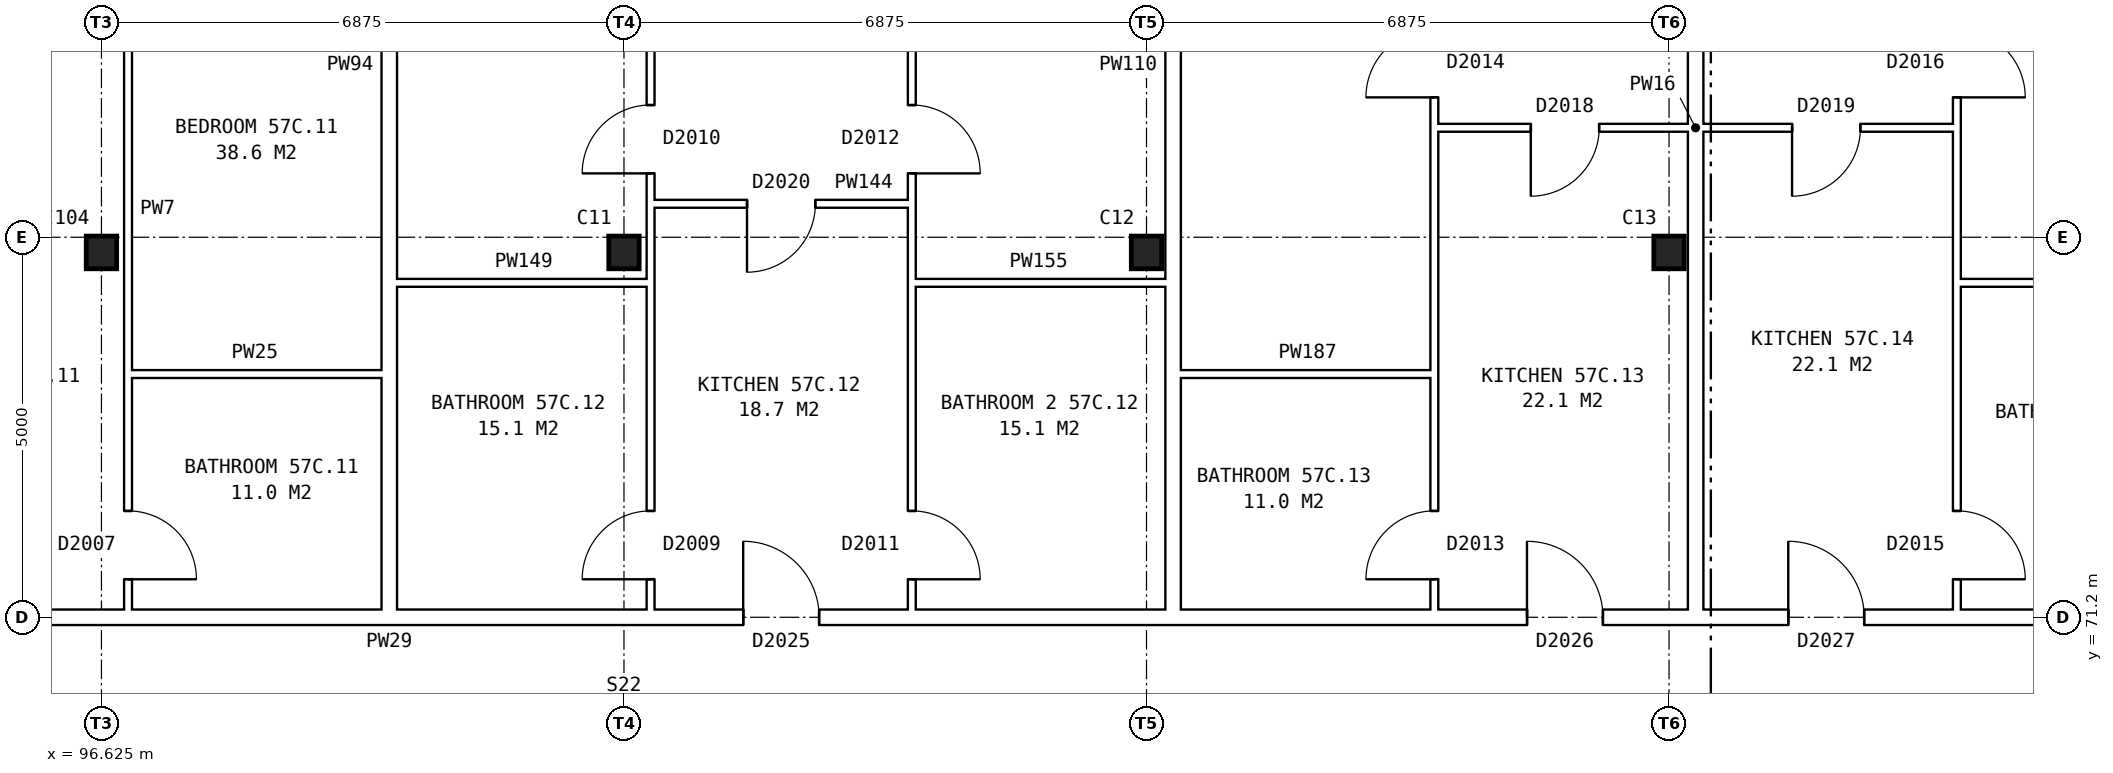
"""IFC4 building model, lengths in metres.
Left out: names, types, materials, properties, quantities, classifications, styles, units other than length and angle.
Written with IfcOpenShell. Run it as: python <this file> out.ifc"""

import sys

from ifc_helpers import new_model, si_unit, direction, frame, frame_2d, origin, origin_2d, place, context, subcontext, project, spatial, rectangle, i_section, extrude, element, fill, save


model = new_model("IFC4")
c1 = context("Model", 3, precision=1e-05, world=origin(), true_north=direction((0.0, 1.0)))
c2 = subcontext(c1, "Body", "Model", "MODEL_VIEW")
j1 = project(units=[si_unit("LENGTHUNIT", "METRE"), si_unit("PLANEANGLEUNIT", "RADIAN")], contexts=[c1])
p1 = place(None, origin())
s1 = spatial("IfcSite", under=j1, at=p1, CompositionType="ELEMENT")
p2 = place(p1, origin())
s2 = spatial("IfcBuilding", under=s1, at=p2, CompositionType="ELEMENT")
p3 = place(p2, frame((0.0, 0.0, 202.8)))
s3 = spatial("IfcBuildingStorey", under=s2, at=p3, CompositionType="ELEMENT", Elevation=202.8)
for number, where, z_axis, x_axis in (
    (1, (96.625, 76.0, 0.0), (0.0, 0.0, 1.0), (1.0, 0.0, 0.0)),
    (2, (103.5, 76.0, 0.0), (0.0, 0.0, 1.0), (1.0, 0.0, 0.0)),
    (3, (110.375, 76.0, 0.0), (0.0, 0.0, 1.0), (1.0, 0.0, 0.0)),
    (4, (117.25, 76.0, 0.0), (0.0, 0.0, 1.0), (1.0, 0.0, 0.0)),
):
    element("IfcColumn", number, at=place(p3, frame(where, z_axis=z_axis, x_axis=x_axis)), inside=s3, PredefinedType="COLUMN", context=c2, shape_type="SweptSolid", body=[
        extrude(i_section(OverallWidth=0.4, OverallDepth=0.43, WebThickness=0.04, FlangeThickness=0.04, at=origin_2d()), origin(), (0.0, 0.0, 1.0), 2.85),
    ])
p4 = place(p3, frame((83.225, 71.2, 0.0), z_axis=(0.0, 0.0, 1.0), x_axis=(1.0, 0.0, 0.0)))
e5 = element("IfcWall", 5, at=p4, inside=s3, PredefinedType="PARTITIONING", context=c2, shape_type="SweptSolid", body=[
    extrude(rectangle(XDim=41.25, YDim=0.2, at=frame_2d((20.625, 0.0))), origin(), (0.0, 0.0, 1.0), 2.85),
])
p5 = place(p4, frame((4.656, 0.0, 0.0)))
e6 = element("IfcOpeningElement", 6, at=p5, cuts=e5, PredefinedType="OPENING", context=c2, shape_type="SweptSolid", body=[
    extrude(rectangle(XDim=1.0, YDim=2.1, at=frame_2d((0.5, 1.05))), frame((0.0, 0.11, 0.0), z_axis=(0.0, -1.0, 0.0), x_axis=(1.0, 0.0, 0.0)), (0.0, 0.0, 1.0), 0.22),
])
p6 = place(p4, frame((11.531, 0.0, 0.0)))
e7 = element("IfcOpeningElement", 7, at=p6, cuts=e5, PredefinedType="OPENING", context=c2, shape_type="SweptSolid", body=[
    extrude(rectangle(XDim=1.0, YDim=2.1, at=frame_2d((0.5, 1.05))), frame((0.0, 0.11, 0.0), z_axis=(0.0, -1.0, 0.0), x_axis=(1.0, 0.0, 0.0)), (0.0, 0.0, 1.0), 0.22),
])
p7 = place(p4, frame((21.844, 0.0, 0.0)))
e8 = element("IfcOpeningElement", 8, at=p7, cuts=e5, PredefinedType="OPENING", context=c2, shape_type="SweptSolid", body=[
    extrude(rectangle(XDim=1.0, YDim=2.1, at=frame_2d((0.5, 1.05))), frame((0.0, 0.11, 0.0), z_axis=(0.0, -1.0, 0.0), x_axis=(1.0, 0.0, 0.0)), (0.0, 0.0, 1.0), 0.22),
])
p8 = place(p4, frame((32.156, 0.0, 0.0)))
e9 = element("IfcOpeningElement", 9, at=p8, cuts=e5, PredefinedType="OPENING", context=c2, shape_type="SweptSolid", body=[
    extrude(rectangle(XDim=1.0, YDim=2.1, at=frame_2d((0.5, 1.05))), frame((0.0, 0.11, 0.0), z_axis=(0.0, -1.0, 0.0), x_axis=(1.0, 0.0, 0.0)), (0.0, 0.0, 1.0), 0.22),
])
p9 = place(p4, frame((35.594, 0.0, 0.0)))
e10 = element("IfcOpeningElement", 10, at=p9, cuts=e5, PredefinedType="OPENING", context=c2, shape_type="SweptSolid", body=[
    extrude(rectangle(XDim=1.0, YDim=2.1, at=frame_2d((0.5, 1.05))), frame((0.0, 0.11, 0.0), z_axis=(0.0, -1.0, 0.0), x_axis=(1.0, 0.0, 0.0)), (0.0, 0.0, 1.0), 0.22),
])
p10 = place(p3, frame((96.975, 74.4, 0.0), z_axis=(0.0, 0.0, 1.0), x_axis=(1.0, 0.0, 0.0)))
e11 = element("IfcWall", 11, at=p10, inside=s3, PredefinedType="PARTITIONING", context=c2, shape_type="SweptSolid", body=[
    extrude(rectangle(XDim=3.337, YDim=0.1, at=frame_2d((1.668, 0.0))), origin(), (0.0, 0.0, 1.0), 2.85),
])
p11 = place(p3, frame((110.825, 74.4, 0.0), z_axis=(0.0, 0.0, 1.0), x_axis=(1.0, 0.0, 0.0)))
e12 = element("IfcWall", 12, at=p11, inside=s3, PredefinedType="PARTITIONING", context=c2, shape_type="SweptSolid", body=[
    extrude(rectangle(XDim=3.337, YDim=0.1, at=frame_2d((1.668, 0.0))), origin(), (0.0, 0.0, 1.0), 2.85),
])
p12 = place(p3, frame((100.512, 75.6, 0.0), z_axis=(0.0, 0.0, 1.0), x_axis=(1.0, 0.0, 0.0)))
e13 = element("IfcWall", 13, at=p12, inside=s3, PredefinedType="PARTITIONING", context=c2, shape_type="SweptSolid", body=[
    extrude(rectangle(XDim=3.338, YDim=0.1, at=frame_2d((1.669, 0.0))), origin(), (0.0, 0.0, 1.0), 2.85),
])
for number, where, z_axis, x_axis in (
    (14, (107.287, 75.6, 0.0), (0.0, 0.0, 1.0), (1.0, 0.0, 0.0)),
    (15, (121.037, 75.6, 0.0), (0.0, 0.0, 1.0), (1.0, 0.0, 0.0)),
):
    element("IfcWall", number, at=place(p3, frame(where, z_axis=z_axis, x_axis=x_axis)), inside=s3, PredefinedType="PARTITIONING", context=c2, shape_type="SweptSolid", body=[
        extrude(rectangle(XDim=3.338, YDim=0.1, at=frame_2d((1.669, 0.0))), origin(), (0.0, 0.0, 1.0), 2.85),
    ])
p13 = place(p3, frame((103.85, 76.64, 0.0), z_axis=(0.0, 0.0, 1.0), x_axis=(1.0, 0.0, 0.0)))
e16 = element("IfcWall", 16, at=p13, inside=s3, PredefinedType="PARTITIONING", context=c2, shape_type="SweptSolid", body=[
    extrude(rectangle(XDim=3.437, YDim=0.1, at=frame_2d((1.719, 0.0))), origin(), (0.0, 0.0, 1.0), 2.85),
])
p14 = place(p13, frame((1.269, 0.0, 0.0)))
e17 = element("IfcOpeningElement", 17, at=p14, cuts=e16, PredefinedType="OPENING", context=c2, shape_type="SweptSolid", body=[
    extrude(rectangle(XDim=0.9, YDim=2.1, at=frame_2d((0.45, 1.05))), frame((0.0, 0.06, 0.0), z_axis=(0.0, -1.0, 0.0), x_axis=(1.0, 0.0, 0.0)), (0.0, 0.0, 1.0), 0.12),
])
p15 = place(p3, frame((114.162, 77.64, 0.0), z_axis=(0.0, 0.0, 1.0), x_axis=(1.0, 0.0, 0.0)))
e18 = element("IfcWall", 18, at=p15, inside=s3, PredefinedType="PARTITIONING", context=c2, shape_type="SweptSolid", body=[
    extrude(rectangle(XDim=6.875, YDim=0.1, at=frame_2d((3.438, 0.0))), origin(), (0.0, 0.0, 1.0), 2.85),
])
p16 = place(p15, frame((1.269, 0.0, 0.0)))
e19 = element("IfcOpeningElement", 19, at=p16, cuts=e18, PredefinedType="OPENING", context=c2, shape_type="SweptSolid", body=[
    extrude(rectangle(XDim=0.9, YDim=2.1, at=frame_2d((0.45, 1.05))), frame((0.0, 0.06, 0.0), z_axis=(0.0, -1.0, 0.0), x_axis=(1.0, 0.0, 0.0)), (0.0, 0.0, 1.0), 0.12),
])
p17 = place(p15, frame((4.707, 0.0, 0.0)))
e20 = element("IfcOpeningElement", 20, at=p17, cuts=e18, PredefinedType="OPENING", context=c2, shape_type="SweptSolid", body=[
    extrude(rectangle(XDim=0.9, YDim=2.1, at=frame_2d((0.45, 1.05))), frame((0.0, 0.06, 0.0), z_axis=(0.0, -1.0, 0.0), x_axis=(1.0, 0.0, 0.0)), (0.0, 0.0, 1.0), 0.12),
])
p18 = place(p3, frame((96.975, 71.3, 0.0), z_axis=(0.0, 0.0, 1.0), x_axis=(0.0, 1.0, 0.0)))
e21 = element("IfcWall", 21, at=p18, inside=s3, PredefinedType="PARTITIONING", context=c2, shape_type="SweptSolid", body=[
    extrude(rectangle(XDim=14.34, YDim=0.1, at=frame_2d((7.17, 0.0))), origin(), (0.0, 0.0, 1.0), 2.85),
])
p19 = place(p18, frame((9.24, 0.0, 0.0)))
e22 = element("IfcOpeningElement", 22, at=p19, cuts=e21, PredefinedType="OPENING", context=c2, shape_type="SweptSolid", body=[
    extrude(rectangle(XDim=0.9, YDim=2.1, at=frame_2d((0.45, 1.05))), frame((0.0, 0.06, 0.0), z_axis=(0.0, -1.0, 0.0), x_axis=(1.0, 0.0, 0.0)), (0.0, 0.0, 1.0), 0.12),
])
p20 = place(p18, frame((0.4, 0.0, 0.0)))
e23 = element("IfcOpeningElement", 23, at=p20, cuts=e21, PredefinedType="OPENING", context=c2, shape_type="SweptSolid", body=[
    extrude(rectangle(XDim=0.9, YDim=2.1, at=frame_2d((0.45, 1.05))), frame((0.0, 0.06, 0.0), z_axis=(0.0, -1.0, 0.0), x_axis=(1.0, 0.0, 0.0)), (0.0, 0.0, 1.0), 0.12),
])
p21 = place(p3, frame((100.412, 71.3, 0.0), z_axis=(0.0, 0.0, 1.0), x_axis=(0.0, 1.0, 0.0)))
e24 = element("IfcWall", 24, at=p21, inside=s3, PredefinedType="PARTITIONING", context=c2, shape_type="SweptSolid", body=[
    extrude(rectangle(XDim=14.34, YDim=0.2, at=frame_2d((7.17, 0.0))), origin(), (0.0, 0.0, 1.0), 2.85),
])
p22 = place(p3, frame((103.85, 71.3, 0.0), z_axis=(0.0, 0.0, 1.0), x_axis=(0.0, 1.0, 0.0)))
e25 = element("IfcWall", 25, at=p22, inside=s3, PredefinedType="PARTITIONING", context=c2, shape_type="SweptSolid", body=[
    extrude(rectangle(XDim=14.34, YDim=0.1, at=frame_2d((7.17, 0.0))), origin(), (0.0, 0.0, 1.0), 2.85),
])
p23 = place(p22, frame((5.74, 0.0, 0.0)))
e26 = element("IfcOpeningElement", 26, at=p23, cuts=e25, PredefinedType="OPENING", context=c2, shape_type="SweptSolid", body=[
    extrude(rectangle(XDim=0.9, YDim=2.1, at=frame_2d((0.45, 1.05))), frame((0.0, 0.06, 0.0), z_axis=(0.0, -1.0, 0.0), x_axis=(1.0, 0.0, 0.0)), (0.0, 0.0, 1.0), 0.12),
])
p24 = place(p22, frame((0.4, 0.0, 0.0)))
e27 = element("IfcOpeningElement", 27, at=p24, cuts=e25, PredefinedType="OPENING", context=c2, shape_type="SweptSolid", body=[
    extrude(rectangle(XDim=0.9, YDim=2.1, at=frame_2d((0.45, 1.05))), frame((0.0, 0.06, 0.0), z_axis=(0.0, -1.0, 0.0), x_axis=(1.0, 0.0, 0.0)), (0.0, 0.0, 1.0), 0.12),
])
p25 = place(p3, frame((107.287, 71.3, 0.0), z_axis=(0.0, 0.0, 1.0), x_axis=(0.0, 1.0, 0.0)))
e28 = element("IfcWall", 28, at=p25, inside=s3, PredefinedType="PARTITIONING", context=c2, shape_type="SweptSolid", body=[
    extrude(rectangle(XDim=14.34, YDim=0.1, at=frame_2d((7.17, 0.0))), origin(), (0.0, 0.0, 1.0), 2.85),
])
p26 = place(p25, frame((5.74, 0.0, 0.0)))
e29 = element("IfcOpeningElement", 29, at=p26, cuts=e28, PredefinedType="OPENING", context=c2, shape_type="SweptSolid", body=[
    extrude(rectangle(XDim=0.9, YDim=2.1, at=frame_2d((0.45, 1.05))), frame((0.0, 0.06, 0.0), z_axis=(0.0, -1.0, 0.0), x_axis=(1.0, 0.0, 0.0)), (0.0, 0.0, 1.0), 0.12),
])
p27 = place(p25, frame((0.4, 0.0, 0.0)))
e30 = element("IfcOpeningElement", 30, at=p27, cuts=e28, PredefinedType="OPENING", context=c2, shape_type="SweptSolid", body=[
    extrude(rectangle(XDim=0.9, YDim=2.1, at=frame_2d((0.45, 1.05))), frame((0.0, 0.06, 0.0), z_axis=(0.0, -1.0, 0.0), x_axis=(1.0, 0.0, 0.0)), (0.0, 0.0, 1.0), 0.12),
])
p28 = place(p3, frame((110.725, 71.3, 0.0), z_axis=(0.0, 0.0, 1.0), x_axis=(0.0, 1.0, 0.0)))
e31 = element("IfcWall", 31, at=p28, inside=s3, PredefinedType="PARTITIONING", context=c2, shape_type="SweptSolid", body=[
    extrude(rectangle(XDim=14.34, YDim=0.2, at=frame_2d((7.17, 0.0))), origin(), (0.0, 0.0, 1.0), 2.85),
])
p29 = place(p3, frame((114.162, 71.3, 0.0), z_axis=(0.0, 0.0, 1.0), x_axis=(0.0, 1.0, 0.0)))
e32 = element("IfcWall", 32, at=p29, inside=s3, PredefinedType="PARTITIONING", context=c2, shape_type="SweptSolid", body=[
    extrude(rectangle(XDim=14.34, YDim=0.1, at=frame_2d((7.17, 0.0))), origin(), (0.0, 0.0, 1.0), 2.85),
])
p30 = place(p29, frame((6.74, 0.0, 0.0)))
e33 = element("IfcOpeningElement", 33, at=p30, cuts=e32, PredefinedType="OPENING", context=c2, shape_type="SweptSolid", body=[
    extrude(rectangle(XDim=0.9, YDim=2.1, at=frame_2d((0.45, 1.05))), frame((0.0, 0.06, 0.0), z_axis=(0.0, -1.0, 0.0), x_axis=(1.0, 0.0, 0.0)), (0.0, 0.0, 1.0), 0.12),
])
p31 = place(p29, frame((0.4, 0.0, 0.0)))
e34 = element("IfcOpeningElement", 34, at=p31, cuts=e32, PredefinedType="OPENING", context=c2, shape_type="SweptSolid", body=[
    extrude(rectangle(XDim=0.9, YDim=2.1, at=frame_2d((0.45, 1.05))), frame((0.0, 0.06, 0.0), z_axis=(0.0, -1.0, 0.0), x_axis=(1.0, 0.0, 0.0)), (0.0, 0.0, 1.0), 0.12),
])
p32 = place(p3, frame((117.6, 71.3, 0.0), z_axis=(0.0, 0.0, 1.0), x_axis=(0.0, 1.0, 0.0)))
e35 = element("IfcWall", 35, at=p32, inside=s3, PredefinedType="PARTITIONING", context=c2, shape_type="SweptSolid", body=[
    extrude(rectangle(XDim=14.34, YDim=0.2, at=frame_2d((7.17, 0.0))), origin(), (0.0, 0.0, 1.0), 2.85),
])
p33 = place(p3, frame((121.037, 71.3, 0.0), z_axis=(0.0, 0.0, 1.0), x_axis=(0.0, 1.0, 0.0)))
e36 = element("IfcWall", 36, at=p33, inside=s3, PredefinedType="PARTITIONING", context=c2, shape_type="SweptSolid", body=[
    extrude(rectangle(XDim=14.34, YDim=0.1, at=frame_2d((7.17, 0.0))), origin(), (0.0, 0.0, 1.0), 2.85),
])
p34 = place(p33, frame((6.74, 0.0, 0.0)))
e37 = element("IfcOpeningElement", 37, at=p34, cuts=e36, PredefinedType="OPENING", context=c2, shape_type="SweptSolid", body=[
    extrude(rectangle(XDim=0.9, YDim=2.1, at=frame_2d((0.45, 1.05))), frame((0.0, 0.06, 0.0), z_axis=(0.0, -1.0, 0.0), x_axis=(1.0, 0.0, 0.0)), (0.0, 0.0, 1.0), 0.12),
])
p35 = place(p33, frame((0.4, 0.0, 0.0)))
e38 = element("IfcOpeningElement", 38, at=p35, cuts=e36, PredefinedType="OPENING", context=c2, shape_type="SweptSolid", body=[
    extrude(rectangle(XDim=0.9, YDim=2.1, at=frame_2d((0.45, 1.05))), frame((0.0, 0.06, 0.0), z_axis=(0.0, -1.0, 0.0), x_axis=(1.0, 0.0, 0.0)), (0.0, 0.0, 1.0), 0.12),
])
p36 = place(p20, frame((0.9, 0.0, 0.0), z_axis=(0.0, 0.0, 1.0), x_axis=(-1.0, 0.0, 0.0)))
e39 = element("IfcDoor", 39, at=p36, inside=s3, OperationType="SINGLE_SWING_RIGHT", PredefinedType="DOOR", context=c2, shape_type="SweptSolid", body=[
    extrude(rectangle(XDim=0.9, YDim=2.1, at=frame_2d((0.45, 1.05))), frame((0.0, 0.025, 0.0), z_axis=(0.0, -1.0, 0.0), x_axis=(1.0, 0.0, 0.0)), (0.0, 0.0, 1.0), 0.05),
])
fill(e23, e39)
p37 = place(p23, origin())
e40 = element("IfcDoor", 40, at=p37, inside=s3, OperationType="SINGLE_SWING_LEFT", PredefinedType="DOOR", context=c2, shape_type="SweptSolid", body=[
    extrude(rectangle(XDim=0.9, YDim=2.1, at=frame_2d((0.45, 1.05))), frame((0.0, 0.025, 0.0), z_axis=(0.0, -1.0, 0.0), x_axis=(1.0, 0.0, 0.0)), (0.0, 0.0, 1.0), 0.05),
])
fill(e26, e40)
p38 = place(p26, frame((0.9, 0.0, 0.0), z_axis=(0.0, 0.0, 1.0), x_axis=(-1.0, 0.0, 0.0)))
e41 = element("IfcDoor", 41, at=p38, inside=s3, OperationType="SINGLE_SWING_RIGHT", PredefinedType="DOOR", context=c2, shape_type="SweptSolid", body=[
    extrude(rectangle(XDim=0.9, YDim=2.1, at=frame_2d((0.45, 1.05))), frame((0.0, 0.025, 0.0), z_axis=(0.0, -1.0, 0.0), x_axis=(1.0, 0.0, 0.0)), (0.0, 0.0, 1.0), 0.05),
])
fill(e29, e41)
p39 = place(p7, origin())
e42 = element("IfcDoor", 42, at=p39, inside=s3, OperationType="SINGLE_SWING_LEFT", PredefinedType="DOOR", context=c2, shape_type="SweptSolid", body=[
    extrude(rectangle(XDim=1.0, YDim=2.1, at=frame_2d((0.5, 1.05))), frame((0.0, 0.025, 0.0), z_axis=(0.0, -1.0, 0.0), x_axis=(1.0, 0.0, 0.0)), (0.0, 0.0, 1.0), 0.05),
])
fill(e8, e42)
p40 = place(p14, frame((0.9, 0.0, 0.0), z_axis=(0.0, 0.0, 1.0), x_axis=(-1.0, 0.0, 0.0)))
e43 = element("IfcDoor", 43, at=p40, inside=s3, OperationType="SINGLE_SWING_RIGHT", PredefinedType="DOOR", context=c2, shape_type="SweptSolid", body=[
    extrude(rectangle(XDim=0.9, YDim=2.1, at=frame_2d((0.45, 1.05))), frame((0.0, 0.025, 0.0), z_axis=(0.0, -1.0, 0.0), x_axis=(1.0, 0.0, 0.0)), (0.0, 0.0, 1.0), 0.05),
])
fill(e17, e43)
p41 = place(p24, origin())
e44 = element("IfcDoor", 44, at=p41, inside=s3, OperationType="SINGLE_SWING_LEFT", PredefinedType="DOOR", context=c2, shape_type="SweptSolid", body=[
    extrude(rectangle(XDim=0.9, YDim=2.1, at=frame_2d((0.45, 1.05))), frame((0.0, 0.025, 0.0), z_axis=(0.0, -1.0, 0.0), x_axis=(1.0, 0.0, 0.0)), (0.0, 0.0, 1.0), 0.05),
])
fill(e27, e44)
p42 = place(p27, frame((0.9, 0.0, 0.0), z_axis=(0.0, 0.0, 1.0), x_axis=(-1.0, 0.0, 0.0)))
e45 = element("IfcDoor", 45, at=p42, inside=s3, OperationType="SINGLE_SWING_RIGHT", PredefinedType="DOOR", context=c2, shape_type="SweptSolid", body=[
    extrude(rectangle(XDim=0.9, YDim=2.1, at=frame_2d((0.45, 1.05))), frame((0.0, 0.025, 0.0), z_axis=(0.0, -1.0, 0.0), x_axis=(1.0, 0.0, 0.0)), (0.0, 0.0, 1.0), 0.05),
])
fill(e30, e45)
p43 = place(p30, origin())
e46 = element("IfcDoor", 46, at=p43, inside=s3, OperationType="SINGLE_SWING_LEFT", PredefinedType="DOOR", context=c2, shape_type="SweptSolid", body=[
    extrude(rectangle(XDim=0.9, YDim=2.1, at=frame_2d((0.45, 1.05))), frame((0.0, 0.025, 0.0), z_axis=(0.0, -1.0, 0.0), x_axis=(1.0, 0.0, 0.0)), (0.0, 0.0, 1.0), 0.05),
])
fill(e33, e46)
p44 = place(p8, origin())
e47 = element("IfcDoor", 47, at=p44, inside=s3, OperationType="SINGLE_SWING_LEFT", PredefinedType="DOOR", context=c2, shape_type="SweptSolid", body=[
    extrude(rectangle(XDim=1.0, YDim=2.1, at=frame_2d((0.5, 1.05))), frame((0.0, 0.025, 0.0), z_axis=(0.0, -1.0, 0.0), x_axis=(1.0, 0.0, 0.0)), (0.0, 0.0, 1.0), 0.05),
])
fill(e9, e47)
p45 = place(p16, frame((0.9, 0.0, 0.0), z_axis=(0.0, 0.0, 1.0), x_axis=(-1.0, 0.0, 0.0)))
e48 = element("IfcDoor", 48, at=p45, inside=s3, OperationType="SINGLE_SWING_RIGHT", PredefinedType="DOOR", context=c2, shape_type="SweptSolid", body=[
    extrude(rectangle(XDim=0.9, YDim=2.1, at=frame_2d((0.45, 1.05))), frame((0.0, 0.025, 0.0), z_axis=(0.0, -1.0, 0.0), x_axis=(1.0, 0.0, 0.0)), (0.0, 0.0, 1.0), 0.05),
])
fill(e19, e48)
p46 = place(p31, origin())
e49 = element("IfcDoor", 49, at=p46, inside=s3, OperationType="SINGLE_SWING_LEFT", PredefinedType="DOOR", context=c2, shape_type="SweptSolid", body=[
    extrude(rectangle(XDim=0.9, YDim=2.1, at=frame_2d((0.45, 1.05))), frame((0.0, 0.025, 0.0), z_axis=(0.0, -1.0, 0.0), x_axis=(1.0, 0.0, 0.0)), (0.0, 0.0, 1.0), 0.05),
])
fill(e34, e49)
p47 = place(p34, frame((0.9, 0.0, 0.0), z_axis=(0.0, 0.0, 1.0), x_axis=(-1.0, 0.0, 0.0)))
e50 = element("IfcDoor", 50, at=p47, inside=s3, OperationType="SINGLE_SWING_RIGHT", PredefinedType="DOOR", context=c2, shape_type="SweptSolid", body=[
    extrude(rectangle(XDim=0.9, YDim=2.1, at=frame_2d((0.45, 1.05))), frame((0.0, 0.025, 0.0), z_axis=(0.0, -1.0, 0.0), x_axis=(1.0, 0.0, 0.0)), (0.0, 0.0, 1.0), 0.05),
])
fill(e37, e50)
p48 = place(p9, origin())
e51 = element("IfcDoor", 51, at=p48, inside=s3, OperationType="SINGLE_SWING_LEFT", PredefinedType="DOOR", context=c2, shape_type="SweptSolid", body=[
    extrude(rectangle(XDim=1.0, YDim=2.1, at=frame_2d((0.5, 1.05))), frame((0.0, 0.025, 0.0), z_axis=(0.0, -1.0, 0.0), x_axis=(1.0, 0.0, 0.0)), (0.0, 0.0, 1.0), 0.05),
])
fill(e10, e51)
p49 = place(p17, frame((0.9, 0.0, 0.0), z_axis=(0.0, 0.0, 1.0), x_axis=(-1.0, 0.0, 0.0)))
e52 = element("IfcDoor", 52, at=p49, inside=s3, OperationType="SINGLE_SWING_RIGHT", PredefinedType="DOOR", context=c2, shape_type="SweptSolid", body=[
    extrude(rectangle(XDim=0.9, YDim=2.1, at=frame_2d((0.45, 1.05))), frame((0.0, 0.025, 0.0), z_axis=(0.0, -1.0, 0.0), x_axis=(1.0, 0.0, 0.0)), (0.0, 0.0, 1.0), 0.05),
])
fill(e20, e52)
p50 = place(p35, frame((0.9, 0.0, 0.0), z_axis=(0.0, 0.0, 1.0), x_axis=(-1.0, 0.0, 0.0)))
e53 = element("IfcDoor", 53, at=p50, inside=s3, OperationType="SINGLE_SWING_RIGHT", PredefinedType="DOOR", context=c2, shape_type="SweptSolid", body=[
    extrude(rectangle(XDim=0.9, YDim=2.1, at=frame_2d((0.45, 1.05))), frame((0.0, 0.025, 0.0), z_axis=(0.0, -1.0, 0.0), x_axis=(1.0, 0.0, 0.0)), (0.0, 0.0, 1.0), 0.05),
])
fill(e38, e53)
save(model, sys.argv[1])
